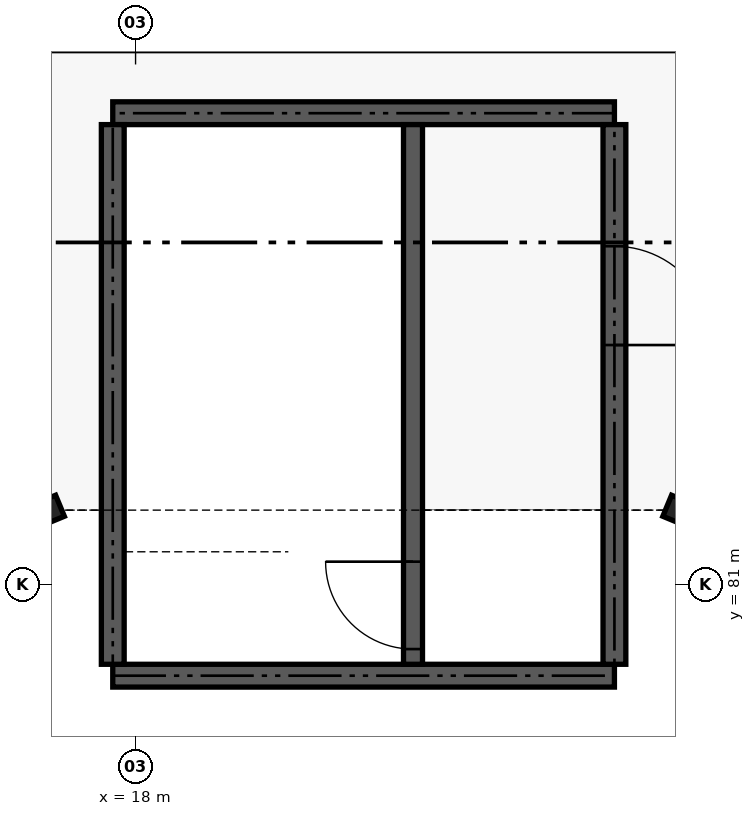
"""IFC4 building model, lengths in metres.
Left out: names, types, materials, properties, quantities, classifications, styles, units other than length and angle.
Written with IfcOpenShell. Run it as: python <this file> out.ifc"""

import sys

from ifc_helpers import new_model, si_unit, direction, frame, frame_2d, origin, origin_2d, place, context, subcontext, project, spatial, rectangle, i_section, extrude, element, fill, save


model = new_model("IFC4")
c1 = context("Model", 3, precision=1e-05, world=origin(), true_north=direction((0.0, 1.0)))
c2 = subcontext(c1, "Body", "Model", "MODEL_VIEW")
j1 = project(units=[si_unit("LENGTHUNIT", "METRE"), si_unit("PLANEANGLEUNIT", "RADIAN")], contexts=[c1])
p1 = place(None, origin())
s1 = spatial("IfcSite", under=j1, at=p1, CompositionType="ELEMENT")
p2 = place(p1, origin())
s2 = spatial("IfcBuilding", under=s1, at=p2, CompositionType="ELEMENT")
p3 = place(p2, frame((0.0, 0.0, 5.4)))
s3 = spatial("IfcBuildingStorey", under=s2, at=p3, CompositionType="ELEMENT", Elevation=5.4)
for number, where, z_axis, x_axis in (
    (1, (25.133, 81.978, 0.0), (0.0, 0.0, 1.0), (0.383, 0.924, 0.0)),
    (2, (16.867, 81.978, 0.0), (0.0, 0.0, 1.0), (-0.383, 0.924, 0.0)),
):
    element("IfcColumn", number, at=place(p3, frame(where, z_axis=z_axis, x_axis=x_axis)), inside=s3, PredefinedType="COLUMN", context=c2, shape_type="SweptSolid", body=[
        extrude(i_section(OverallWidth=0.3, OverallDepth=0.3, WebThickness=0.011, FlangeThickness=0.019, FilletRadius=0.027, at=origin_2d()), origin(), (0.0, 0.0, 1.0), 5.18),
    ])
for number, where, z_axis, x_axis in (
    (3, (17.7, 79.8, 0.0), (0.0, 0.0, 1.0), (1.0, 0.0, 0.0)),
    (4, (17.7, 87.2, 0.0), (0.0, 0.0, 1.0), (1.0, 0.0, 0.0)),
):
    element("IfcWall", number, at=place(p3, frame(where, z_axis=z_axis, x_axis=x_axis)), inside=s3, PredefinedType="SHEAR", context=c2, shape_type="SweptSolid", body=[
        extrude(rectangle(XDim=6.6, YDim=0.3, at=frame_2d((3.3, 0.0))), origin(), (0.0, 0.0, 1.0), 4.0),
    ])
p4 = place(p3, frame((17.7, 79.95, 0.0), z_axis=(0.0, 0.0, 1.0), x_axis=(0.0, 1.0, 0.0)))
e5 = element("IfcWall", 5, at=p4, inside=s3, PredefinedType="SHEAR", context=c2, shape_type="SweptSolid", body=[
    extrude(rectangle(XDim=7.1, YDim=0.3, at=frame_2d((3.55, 0.0))), origin(), (0.0, 0.0, 1.0), 4.0),
])
p5 = place(p3, frame((24.3, 79.95, 0.0), z_axis=(0.0, 0.0, 1.0), x_axis=(0.0, 1.0, 0.0)))
e6 = element("IfcWall", 6, at=p5, inside=s3, PredefinedType="SHEAR", context=c2, shape_type="SweptSolid", body=[
    extrude(rectangle(XDim=7.1, YDim=0.3, at=frame_2d((3.55, 0.0))), origin(), (0.0, 0.0, 1.0), 4.0),
])
p6 = place(p5, frame((4.2, 0.0, 0.0)))
e7 = element("IfcOpeningElement", 7, at=p6, cuts=e6, PredefinedType="OPENING", context=c2, shape_type="SweptSolid", body=[
    extrude(rectangle(XDim=1.3, YDim=2.15, at=frame_2d((0.65, 1.075))), frame((0.0, 0.16, 0.0), z_axis=(0.0, -1.0, 0.0), x_axis=(1.0, 0.0, 0.0)), (0.0, 0.0, 1.0), 0.32),
])
p7 = place(p3, frame((21.65, 79.95, 0.0), z_axis=(0.0, 0.0, 1.0), x_axis=(0.0, 1.0, 0.0)))
e8 = element("IfcWall", 8, at=p7, inside=s3, PredefinedType="SHEAR", context=c2, shape_type="SweptSolid", body=[
    extrude(rectangle(XDim=7.1, YDim=0.25, at=frame_2d((3.55, 0.0))), origin(), (0.0, 0.0, 1.0), 4.0),
])
p8 = place(p7, frame((0.2, 0.0, 0.0)))
e9 = element("IfcOpeningElement", 9, at=p8, cuts=e8, PredefinedType="OPENING", context=c2, shape_type="SweptSolid", body=[
    extrude(rectangle(XDim=1.15, YDim=2.15, at=frame_2d((0.575, 1.075))), frame((0.0, 0.135, 0.0), z_axis=(0.0, -1.0, 0.0), x_axis=(1.0, 0.0, 0.0)), (0.0, 0.0, 1.0), 0.27),
])
p9 = place(p6, frame((1.3, 0.0, 0.0), z_axis=(0.0, 0.0, 1.0), x_axis=(-1.0, 0.0, 0.0)))
e10 = element("IfcDoor", 10, at=p9, inside=s3, OperationType="DOUBLE_DOOR_SINGLE_SWING", PredefinedType="DOOR", context=c2, shape_type="SweptSolid", body=[
    extrude(rectangle(XDim=1.3, YDim=2.15, at=frame_2d((0.65, 1.075))), frame((0.0, 0.025, 0.0), z_axis=(0.0, -1.0, 0.0), x_axis=(1.0, 0.0, 0.0)), (0.0, 0.0, 1.0), 0.05),
])
fill(e7, e10)
p10 = place(p8, frame((1.15, 0.0, 0.0), z_axis=(0.0, 0.0, 1.0), x_axis=(-1.0, 0.0, 0.0)))
e11 = element("IfcDoor", 11, at=p10, inside=s3, OperationType="SINGLE_SWING_RIGHT", PredefinedType="DOOR", context=c2, shape_type="SweptSolid", body=[
    extrude(rectangle(XDim=1.15, YDim=2.15, at=frame_2d((0.575, 1.075))), frame((0.0, 0.025, 0.0), z_axis=(0.0, -1.0, 0.0), x_axis=(1.0, 0.0, 0.0)), (0.0, 0.0, 1.0), 0.05),
])
fill(e9, e11)
save(model, sys.argv[1])
